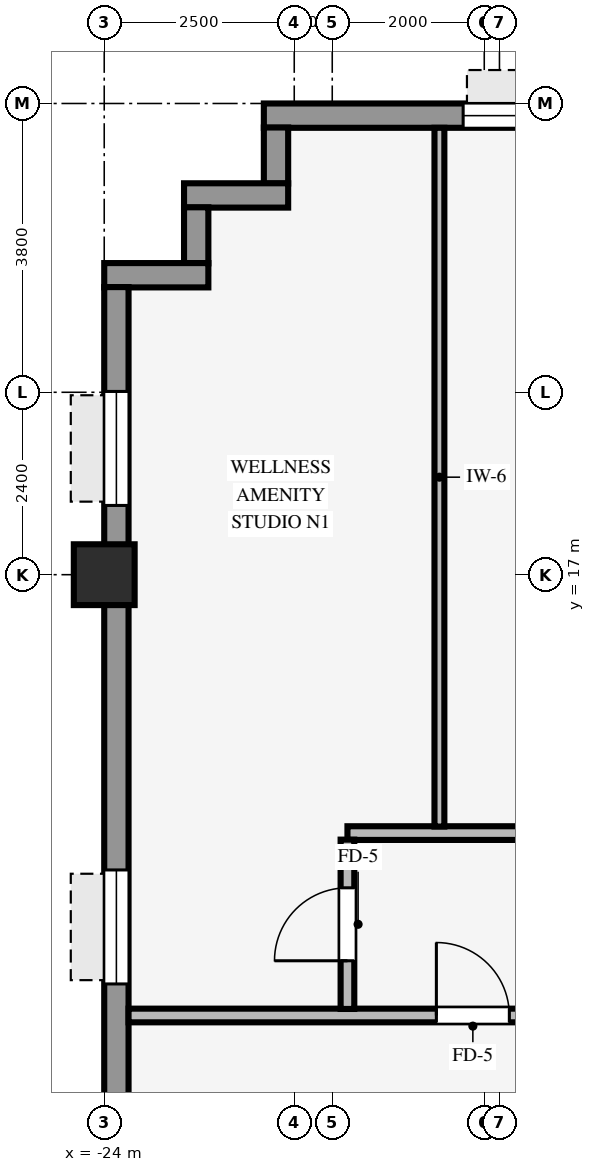
"""IFC4 building model, lengths in metres.
Left out: names, types, materials, properties, quantities, classifications, styles, units other than length and angle.
Written with IfcOpenShell. Run it as: python <this file> out.ifc"""

import sys

from ifc_helpers import new_model, si_unit, direction, frame, frame_2d, origin, origin_2d, place, context, subcontext, project, spatial, rectangle, hollow_rectangle, extrude, source, transform, mapped, element, fill, save


model = new_model("IFC4")
c1 = context("Model", 3, precision=1e-05, world=origin(), true_north=direction((0.0, 1.0)))
c2 = subcontext(c1, "Body", "Model", "MODEL_VIEW")
j1 = project(units=[si_unit("LENGTHUNIT", "METRE"), si_unit("PLANEANGLEUNIT", "RADIAN")], contexts=[c1])
p1 = place(None, origin())
s1 = spatial("IfcSite", under=j1, at=p1, CompositionType="ELEMENT")
p2 = place(p1, origin())
s2 = spatial("IfcBuilding", under=s1, at=p2, CompositionType="ELEMENT")
p3 = place(p2, frame((0.0, 0.0, 86.0)))
s3 = spatial("IfcBuildingStorey", under=s2, at=p3, CompositionType="ELEMENT", Elevation=86.0)
p4 = place(p3, frame((-24.0, 17.0, -0.4), z_axis=(0.0, 0.0, 1.0), x_axis=(1.0, 0.0, 0.0)))
e1 = element("IfcColumn", 1, at=p4, inside=s3, PredefinedType="COLUMN", context=c2, shape_type="SweptSolid", body=[
    extrude(hollow_rectangle(XDim=0.8, YDim=0.8, WallThickness=0.055, InnerFilletRadius=0.055, OuterFilletRadius=0.11, at=origin_2d()), origin(), (0.0, 0.0, 1.0), 3.77),
])
p5 = place(p3, frame((-21.9, 23.04, 0.0), z_axis=(0.0, 0.0, 1.0), x_axis=(1.0, 0.0, 0.0)))
e2 = element("IfcWall", 2, at=p5, inside=s3, PredefinedType="STANDARD", context=c2, shape_type="SweptSolid", body=[
    extrude(rectangle(XDim=43.8, YDim=0.32, at=frame_2d((21.9, 0.0))), origin(), (0.0, 0.0, 1.0), 2.705),
])
p6 = place(p5, frame((2.622, 0.0, 0.8)))
e3 = element("IfcOpeningElement", 3, at=p6, cuts=e2, PredefinedType="OPENING", context=c2, shape_type="SweptSolid", body=[
    extrude(rectangle(XDim=2.3, YDim=1.62, at=frame_2d((1.15, 0.81))), frame((0.0, 0.17, 0.0), z_axis=(0.0, -1.0, 0.0), x_axis=(1.0, 0.0, 0.0)), (0.0, 0.0, 1.0), 0.34),
])
p7 = place(p5, frame((8.167, 0.0, 0.8)))
e4 = element("IfcOpeningElement", 4, at=p7, cuts=e2, PredefinedType="OPENING", context=c2, shape_type="SweptSolid", body=[
    extrude(rectangle(XDim=2.3, YDim=1.62, at=frame_2d((1.15, 0.81))), frame((0.0, 0.17, 0.0), z_axis=(0.0, -1.0, 0.0), x_axis=(1.0, 0.0, 0.0)), (0.0, 0.0, 1.0), 0.34),
])
p8 = place(p5, frame((16.106, 0.0, 0.8)))
e5 = element("IfcOpeningElement", 5, at=p8, cuts=e2, PredefinedType="OPENING", context=c2, shape_type="SweptSolid", body=[
    extrude(rectangle(XDim=2.3, YDim=1.62, at=frame_2d((1.15, 0.81))), frame((0.0, 0.17, 0.0), z_axis=(0.0, -1.0, 0.0), x_axis=(1.0, 0.0, 0.0)), (0.0, 0.0, 1.0), 0.34),
])
p9 = place(p5, frame((25.394, 0.0, 0.8)))
e6 = element("IfcOpeningElement", 6, at=p9, cuts=e2, PredefinedType="OPENING", context=c2, shape_type="SweptSolid", body=[
    extrude(rectangle(XDim=2.3, YDim=1.62, at=frame_2d((1.15, 0.81))), frame((0.0, 0.17, 0.0), z_axis=(0.0, -1.0, 0.0), x_axis=(1.0, 0.0, 0.0)), (0.0, 0.0, 1.0), 0.34),
])
p10 = place(p5, frame((34.683, 0.0, 0.8)))
e7 = element("IfcOpeningElement", 7, at=p10, cuts=e2, PredefinedType="OPENING", context=c2, shape_type="SweptSolid", body=[
    extrude(rectangle(XDim=2.3, YDim=1.62, at=frame_2d((1.15, 0.81))), frame((0.0, 0.17, 0.0), z_axis=(0.0, -1.0, 0.0), x_axis=(1.0, 0.0, 0.0)), (0.0, 0.0, 1.0), 0.34),
])
p11 = place(p5, frame((39.328, 0.0, 0.8)))
e8 = element("IfcOpeningElement", 8, at=p11, cuts=e2, PredefinedType="OPENING", context=c2, shape_type="SweptSolid", body=[
    extrude(rectangle(XDim=2.3, YDim=1.62, at=frame_2d((1.15, 0.81))), frame((0.0, 0.17, 0.0), z_axis=(0.0, -1.0, 0.0), x_axis=(1.0, 0.0, 0.0)), (0.0, 0.0, 1.0), 0.34),
])
p12 = place(p3, frame((-21.74, 22.146, 0.0), z_axis=(0.0, 0.0, 1.0), x_axis=(0.0, 1.0, 0.0)))
e9 = element("IfcWall", 9, at=p12, inside=s3, PredefinedType="STANDARD", context=c2, shape_type="SweptSolid", body=[
    extrude(rectangle(XDim=0.738, YDim=0.32, at=frame_2d((0.369, 0.0))), origin(), (0.0, 0.0, 1.0), 3.36),
])
p13 = place(p3, frame((-22.95, 21.99, 0.0), z_axis=(0.0, 0.0, 1.0), x_axis=(1.0, 0.0, 0.0)))
e10 = element("IfcWall", 10, at=p13, inside=s3, PredefinedType="STANDARD", context=c2, shape_type="SweptSolid", body=[
    extrude(rectangle(XDim=1.37, YDim=0.32, at=frame_2d((0.685, 0.0))), origin(), (0.0, 0.0, 1.0), 3.36),
])
p14 = place(p3, frame((-22.79, 21.096, 0.0), z_axis=(0.0, 0.0, 1.0), x_axis=(0.0, 1.0, 0.0)))
e11 = element("IfcWall", 11, at=p14, inside=s3, PredefinedType="STANDARD", context=c2, shape_type="SweptSolid", body=[
    extrude(rectangle(XDim=0.738, YDim=0.32, at=frame_2d((0.369, 0.0))), origin(), (0.0, 0.0, 1.0), 3.36),
])
p15 = place(p3, frame((-24.0, 20.94, 0.0), z_axis=(0.0, 0.0, 1.0), x_axis=(1.0, 0.0, 0.0)))
e12 = element("IfcWall", 12, at=p15, inside=s3, PredefinedType="STANDARD", context=c2, shape_type="SweptSolid", body=[
    extrude(rectangle(XDim=1.37, YDim=0.32, at=frame_2d((0.685, 0.0))), origin(), (0.0, 0.0, 1.0), 3.36),
])
p16 = place(p3, frame((-23.84, -20.784, 0.0), z_axis=(0.0, 0.0, 1.0), x_axis=(0.0, 1.0, 0.0)))
e13 = element("IfcWall", 13, at=p16, inside=s3, PredefinedType="STANDARD", context=c2, shape_type="SweptSolid", body=[
    extrude(rectangle(XDim=41.568, YDim=0.32, at=frame_2d((20.784, 0.0))), origin(), (0.0, 0.0, 1.0), 2.705),
])
p17 = place(p16, frame((15.484, 0.0, 0.0)))
e14 = element("IfcOpeningElement", 14, at=p17, cuts=e13, PredefinedType="OPENING", context=c2, shape_type="SweptSolid", body=[
    extrude(rectangle(XDim=0.98, YDim=2.15, at=frame_2d((0.49, 1.075))), frame((0.0, 0.17, 0.0), z_axis=(0.0, -1.0, 0.0), x_axis=(1.0, 0.0, 0.0)), (0.0, 0.0, 1.0), 0.34),
])
p18 = place(p16, frame((1.373, 0.0, 0.8)))
e15 = element("IfcOpeningElement", 15, at=p18, cuts=e13, PredefinedType="OPENING", context=c2, shape_type="SweptSolid", body=[
    extrude(rectangle(XDim=1.5, YDim=1.6, at=frame_2d((0.75, 0.8))), frame((0.0, 0.17, 0.0), z_axis=(0.0, -1.0, 0.0), x_axis=(1.0, 0.0, 0.0)), (0.0, 0.0, 1.0), 0.34),
])
p19 = place(p16, frame((7.669, 0.0, 0.8)))
e16 = element("IfcOpeningElement", 16, at=p19, cuts=e13, PredefinedType="OPENING", context=c2, shape_type="SweptSolid", body=[
    extrude(rectangle(XDim=1.5, YDim=1.6, at=frame_2d((0.75, 0.8))), frame((0.0, 0.17, 0.0), z_axis=(0.0, -1.0, 0.0), x_axis=(1.0, 0.0, 0.0)), (0.0, 0.0, 1.0), 0.34),
])
p20 = place(p16, frame((12.615, 0.0, 0.8)))
e17 = element("IfcOpeningElement", 17, at=p20, cuts=e13, PredefinedType="OPENING", context=c2, shape_type="SweptSolid", body=[
    extrude(rectangle(XDim=1.5, YDim=1.6, at=frame_2d((0.75, 0.8))), frame((0.0, 0.17, 0.0), z_axis=(0.0, -1.0, 0.0), x_axis=(1.0, 0.0, 0.0)), (0.0, 0.0, 1.0), 0.34),
])
p21 = place(p16, frame((17.561, 0.0, 0.8)))
e18 = element("IfcOpeningElement", 18, at=p21, cuts=e13, PredefinedType="OPENING", context=c2, shape_type="SweptSolid", body=[
    extrude(rectangle(XDim=1.5, YDim=1.6, at=frame_2d((0.75, 0.8))), frame((0.0, 0.17, 0.0), z_axis=(0.0, -1.0, 0.0), x_axis=(1.0, 0.0, 0.0)), (0.0, 0.0, 1.0), 0.34),
])
p22 = place(p16, frame((22.507, 0.0, 0.8)))
e19 = element("IfcOpeningElement", 19, at=p22, cuts=e13, PredefinedType="OPENING", context=c2, shape_type="SweptSolid", body=[
    extrude(rectangle(XDim=1.5, YDim=1.6, at=frame_2d((0.75, 0.8))), frame((0.0, 0.17, 0.0), z_axis=(0.0, -1.0, 0.0), x_axis=(1.0, 0.0, 0.0)), (0.0, 0.0, 1.0), 0.34),
])
p23 = place(p16, frame((27.453, 0.0, 0.8)))
e20 = element("IfcOpeningElement", 20, at=p23, cuts=e13, PredefinedType="OPENING", context=c2, shape_type="SweptSolid", body=[
    extrude(rectangle(XDim=1.5, YDim=1.6, at=frame_2d((0.75, 0.8))), frame((0.0, 0.17, 0.0), z_axis=(0.0, -1.0, 0.0), x_axis=(1.0, 0.0, 0.0)), (0.0, 0.0, 1.0), 0.34),
])
p24 = place(p16, frame((32.399, 0.0, 0.8)))
e21 = element("IfcOpeningElement", 21, at=p24, cuts=e13, PredefinedType="OPENING", context=c2, shape_type="SweptSolid", body=[
    extrude(rectangle(XDim=1.5, YDim=1.6, at=frame_2d((0.75, 0.8))), frame((0.0, 0.17, 0.0), z_axis=(0.0, -1.0, 0.0), x_axis=(1.0, 0.0, 0.0)), (0.0, 0.0, 1.0), 0.34),
])
p25 = place(p16, frame((38.695, 0.0, 0.8)))
e22 = element("IfcOpeningElement", 22, at=p25, cuts=e13, PredefinedType="OPENING", context=c2, shape_type="SweptSolid", body=[
    extrude(rectangle(XDim=1.5, YDim=1.6, at=frame_2d((0.75, 0.8))), frame((0.0, 0.17, 0.0), z_axis=(0.0, -1.0, 0.0), x_axis=(1.0, 0.0, 0.0)), (0.0, 0.0, 1.0), 0.34),
])
p26 = place(p3, frame((-23.68, 11.2, 0.0), z_axis=(0.0, 0.0, 1.0), x_axis=(1.0, 0.0, 0.0)))
e23 = element("IfcWall", 23, at=p26, inside=s3, PredefinedType="PARTITIONING", context=c2, shape_type="SweptSolid", body=[
    extrude(rectangle(XDim=6.18, YDim=0.18, at=frame_2d((3.09, 0.0))), origin(), (0.0, 0.0, 1.0), 3.36),
])
p27 = place(p26, frame((4.05, 0.0, 0.0)))
e24 = element("IfcOpeningElement", 24, at=p27, cuts=e23, PredefinedType="OPENING", context=c2, shape_type="SweptSolid", body=[
    extrude(rectangle(XDim=0.96, YDim=2.1, at=frame_2d((0.48, 1.05))), frame((0.0, 0.1, 0.0), z_axis=(0.0, -1.0, 0.0), x_axis=(1.0, 0.0, 0.0)), (0.0, 0.0, 1.0), 0.2),
])
p28 = place(p3, frame((-20.8, 13.6, 0.0), z_axis=(0.0, 0.0, 1.0), x_axis=(1.0, 0.0, 0.0)))
e25 = element("IfcWall", 25, at=p28, inside=s3, PredefinedType="PARTITIONING", context=c2, shape_type="SweptSolid", body=[
    extrude(rectangle(XDim=5.8, YDim=0.18, at=frame_2d((2.9, 0.0))), origin(), (0.0, 0.0, 1.0), 2.998),
])
p29 = place(p28, frame((3.025, 0.0, 0.0)))
e26 = element("IfcOpeningElement", 26, at=p29, cuts=e25, PredefinedType="OPENING", context=c2, shape_type="SweptSolid", body=[
    extrude(rectangle(XDim=0.96, YDim=2.1, at=frame_2d((0.48, 1.05))), frame((0.0, 0.1, 0.0), z_axis=(0.0, -1.0, 0.0), x_axis=(1.0, 0.0, 0.0)), (0.0, 0.0, 1.0), 0.2),
])
p30 = place(p3, frame((-20.8, 11.286, 0.0), z_axis=(0.0, 0.0, 1.0), x_axis=(0.0, 1.0, 0.0)))
e27 = element("IfcWall", 27, at=p30, inside=s3, PredefinedType="PARTITIONING", context=c2, shape_type="SweptSolid", body=[
    extrude(rectangle(XDim=2.228, YDim=0.18, at=frame_2d((1.114, 0.0))), origin(), (0.0, 0.0, 1.0), 3.36),
])
p31 = place(p30, frame((0.634, 0.0, 0.0)))
e28 = element("IfcOpeningElement", 28, at=p31, cuts=e27, PredefinedType="OPENING", context=c2, shape_type="SweptSolid", body=[
    extrude(rectangle(XDim=0.96, YDim=2.1, at=frame_2d((0.48, 1.05))), frame((0.0, 0.1, 0.0), z_axis=(0.0, -1.0, 0.0), x_axis=(1.0, 0.0, 0.0)), (0.0, 0.0, 1.0), 0.2),
])
p32 = place(p3, frame((-19.59, 13.686, 0.0), z_axis=(0.0, 0.0, 1.0), x_axis=(0.0, 1.0, 0.0)))
e29 = element("IfcWall", 29, at=p32, inside=s3, PredefinedType="PARTITIONING", context=c2, shape_type="SweptSolid", body=[
    extrude(rectangle(XDim=9.194, YDim=0.13, at=frame_2d((4.597, 0.0))), origin(), (0.0, 0.0, 1.0), 3.36),
])
m1 = source(origin(), c2, "Body", "SweptSolid", [
    extrude(rectangle(XDim=2.3, YDim=1.62, at=frame_2d((1.15, 0.81))), frame((0.0, 0.03, 0.0), z_axis=(0.0, -1.0, 0.0), x_axis=(1.0, 0.0, 0.0)), (0.0, 0.0, 1.0), 0.06),
])
p33 = place(p6, origin())
e30 = element("IfcWindow", 30, at=p33, inside=s3, PartitioningType="SINGLE_PANEL", PredefinedType="WINDOW", context=c2, shape_type="MappedRepresentation", body=[
    mapped(m1, transform((0.0, 0.0, 0.0), scale=1.0)),
])
fill(e3, e30)
m2 = source(origin(), c2, "Body", "SweptSolid", [
    extrude(rectangle(XDim=1.5, YDim=1.6, at=frame_2d((0.75, 0.8))), frame((0.0, 0.03, 0.0), z_axis=(0.0, -1.0, 0.0), x_axis=(1.0, 0.0, 0.0)), (0.0, 0.0, 1.0), 0.06),
])
p34 = place(p24, origin())
e31 = element("IfcWindow", 31, at=p34, inside=s3, PartitioningType="SINGLE_PANEL", PredefinedType="WINDOW", context=c2, shape_type="MappedRepresentation", body=[
    mapped(m2, transform((0.0, 0.0, 0.0), scale=1.0)),
])
fill(e21, e31)
p35 = place(p25, origin())
e32 = element("IfcWindow", 32, at=p35, inside=s3, PartitioningType="SINGLE_PANEL", PredefinedType="WINDOW", context=c2, shape_type="MappedRepresentation", body=[
    mapped(m2, transform((0.0, 0.0, 0.0), scale=1.0)),
])
fill(e22, e32)
m3 = source(origin(), c2, "Body", "SweptSolid", [
    extrude(rectangle(XDim=0.96, YDim=2.1, at=frame_2d((0.48, 1.05))), frame((0.0, 0.025, 0.0), z_axis=(0.0, -1.0, 0.0), x_axis=(1.0, 0.0, 0.0)), (0.0, 0.0, 1.0), 0.05),
])
p36 = place(p27, origin())
e33 = element("IfcDoor", 33, at=p36, inside=s3, OperationType="SINGLE_SWING_LEFT", PredefinedType="DOOR", context=c2, shape_type="MappedRepresentation", body=[
    mapped(m3, transform((0.0, 0.0, 0.0), scale=1.0)),
])
fill(e24, e33)
p37 = place(p31, origin())
e34 = element("IfcDoor", 34, at=p37, inside=s3, OperationType="SINGLE_SWING_LEFT", PredefinedType="DOOR", context=c2, shape_type="MappedRepresentation", body=[
    mapped(m3, transform((0.0, 0.0, 0.0), scale=1.0)),
])
fill(e28, e34)
save(model, sys.argv[1])
